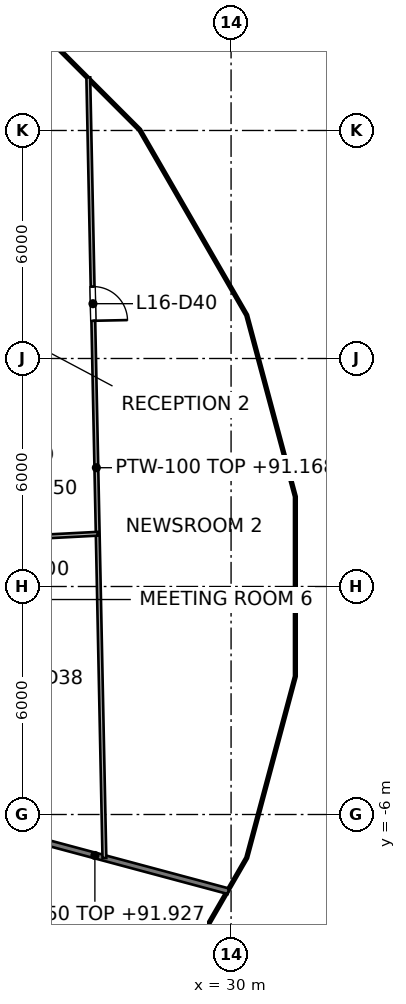
"""IFC4 building model, lengths in metres.
Left out: names, types, materials, properties, quantities, classifications, styles, units other than length and angle.
Written with IfcOpenShell. Run it as: python <this file> out.ifc"""

import sys

from ifc_helpers import new_model, si_unit, direction, frame, frame_2d, origin, place, context, subcontext, project, spatial, rectangle, extrude, element, fill, save


model = new_model("IFC4")
c1 = context("Model", 3, precision=1e-05, world=origin(), true_north=direction((0.0, 1.0)))
c2 = subcontext(c1, "Body", "Model", "MODEL_VIEW")
j1 = project(units=[si_unit("LENGTHUNIT", "METRE"), si_unit("PLANEANGLEUNIT", "RADIAN")], contexts=[c1])
p1 = place(None, origin())
s1 = spatial("IfcSite", under=j1, at=p1, CompositionType="ELEMENT")
p2 = place(p1, origin())
s2 = spatial("IfcBuilding", under=s1, at=p2, CompositionType="ELEMENT")
p3 = place(p2, frame((0.0, 0.0, 88.2)))
s3 = spatial("IfcBuildingStorey", under=s2, at=p3, CompositionType="ELEMENT", Elevation=88.2)
p4 = place(p3, frame((22.905, -6.137, 0.0), z_axis=(0.0, 0.0, 1.0), x_axis=(0.965915974273, -0.258855810529, 0.0)))
e1 = element("IfcWall", 1, at=p4, inside=s3, PredefinedType="PARTITIONING", context=c2, shape_type="SweptSolid", body=[
    extrude(rectangle(XDim=7.271, YDim=0.15, at=frame_2d((3.635, 0.0))), origin(), (0.0, 0.0, 1.0), 3.727),
])
p5 = place(p3, frame((26.243, 13.397, 0.0), z_axis=(0.0, 0.0, 1.0), x_axis=(0.020639766813, -0.999786977324, 0.0)))
e2 = element("IfcWall", 2, at=p5, inside=s3, PredefinedType="PARTITIONING", context=c2, shape_type="SweptSolid", body=[
    extrude(rectangle(XDim=20.546, YDim=0.1, at=frame_2d((10.273, 0.0))), origin(), (0.0, 0.0, 1.0), 2.968),
])
p6 = place(p5, frame((5.506, 0.0, 0.0)))
e3 = element("IfcOpeningElement", 3, at=p6, cuts=e2, PredefinedType="OPENING", context=c2, shape_type="SweptSolid", body=[
    extrude(rectangle(XDim=0.9, YDim=2.1, at=frame_2d((0.45, 1.05))), frame((0.0, 0.05, 0.0), z_axis=(0.0, -1.0, 0.0), x_axis=(1.0, 0.0, 0.0)), (0.0, 0.0, 1.0), 0.1),
])
p7 = place(p3, frame((22.754, 1.193, 0.0), z_axis=(0.0, 0.0, 1.0), x_axis=(0.998643838338, 0.05206231025, 0.0)))
e4 = element("IfcWall", 4, at=p7, inside=s3, PredefinedType="PARTITIONING", context=c2, shape_type="SweptSolid", body=[
    extrude(rectangle(XDim=3.742, YDim=0.1, at=frame_2d((1.871, 0.0))), origin(), (0.0, 0.0, 1.0), 3.9),
])
p8 = place(p6, origin())
e5 = element("IfcDoor", 5, at=p8, inside=s3, OperationType="SINGLE_SWING_RIGHT", PredefinedType="DOOR", context=c2, shape_type="SweptSolid", body=[
    extrude(rectangle(XDim=0.9, YDim=2.1, at=frame_2d((0.45, 1.05))), frame((0.0, 0.025, 0.0), z_axis=(0.0, -1.0, 0.0), x_axis=(1.0, 0.0, 0.0)), (0.0, 0.0, 1.0), 0.05),
])
fill(e3, e5)
save(model, sys.argv[1])
